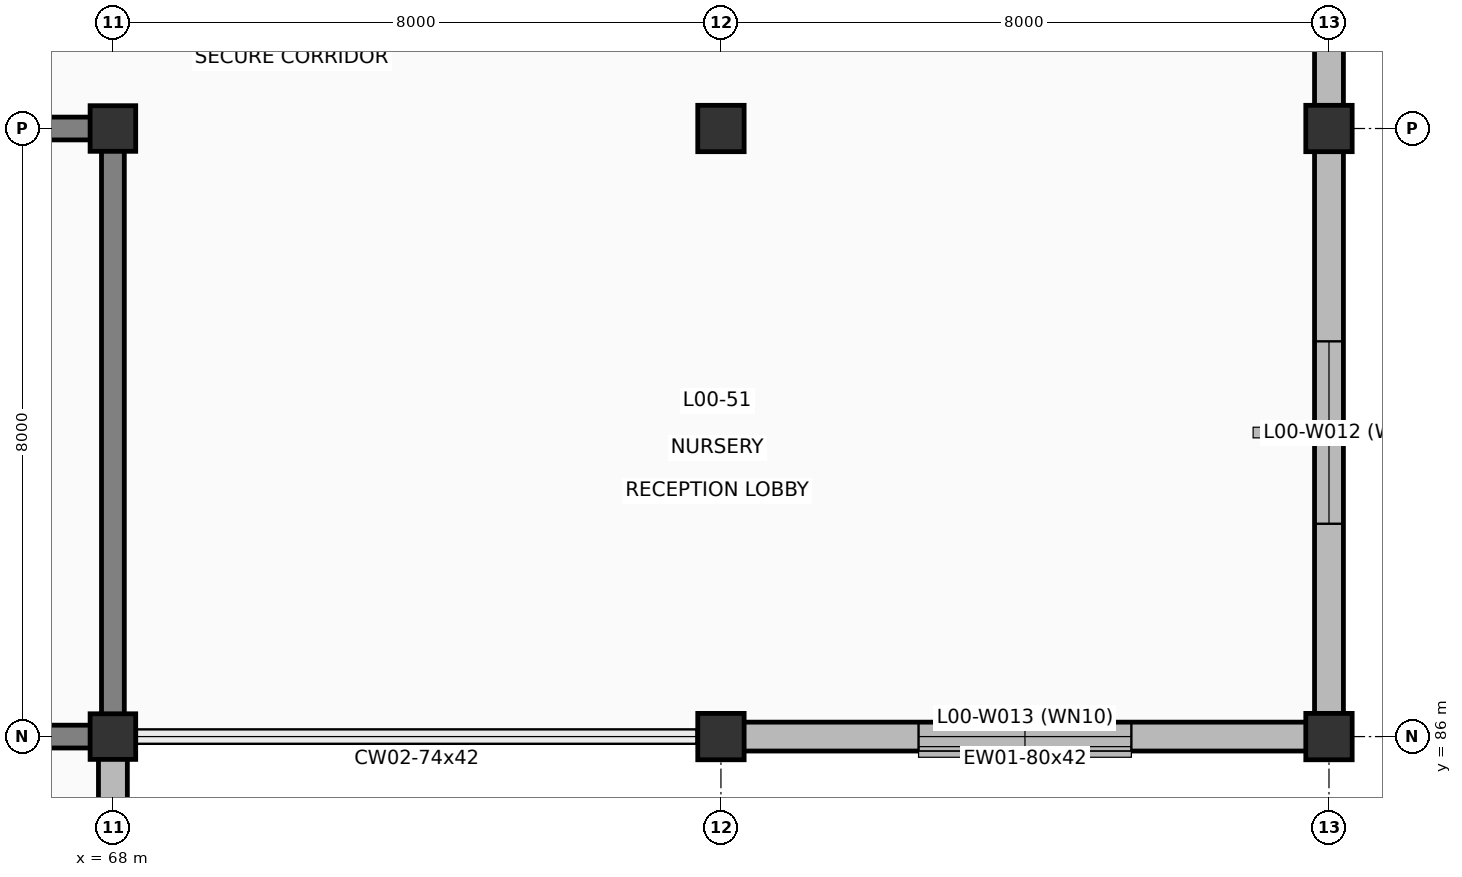
"""IFC4 building model, lengths in metres.
Left out: names, types, materials, properties, quantities, classifications, styles, units other than length and angle.
Written with IfcOpenShell. Run it as: python <this file> out.ifc"""

import sys

from ifc_helpers import new_model, si_unit, direction, frame, frame_2d, origin, origin_2d, place, context, subcontext, project, spatial, rectangle, extrude, element, fill, save


model = new_model("IFC4")
c1 = context("Model", 3, precision=1e-05, world=origin(), true_north=direction((0.0, 1.0)))
c2 = subcontext(c1, "Body", "Model", "MODEL_VIEW")
j1 = project(units=[si_unit("LENGTHUNIT", "METRE"), si_unit("PLANEANGLEUNIT", "RADIAN")], contexts=[c1])
p1 = place(None, origin())
s1 = spatial("IfcSite", under=j1, at=p1, CompositionType="ELEMENT")
p2 = place(p1, origin())
s2 = spatial("IfcBuilding", under=s1, at=p2, CompositionType="ELEMENT")
p3 = place(p2, origin())
s3 = spatial("IfcBuildingStorey", under=s2, at=p3, CompositionType="ELEMENT", Elevation=0.0)
for number, where, z_axis, x_axis in (
    (1, (68.0, 86.0, 0.0), (0.0, 0.0, 1.0), (1.0, 0.0, 0.0)),
    (2, (68.0, 94.0, 0.0), (0.0, 0.0, 1.0), (1.0, 0.0, 0.0)),
):
    element("IfcColumn", number, at=place(p3, frame(where, z_axis=z_axis, x_axis=x_axis)), inside=s3, PredefinedType="COLUMN", context=c2, shape_type="SweptSolid", body=[
        extrude(rectangle(XDim=0.6, YDim=0.6, at=origin_2d()), origin(), (0.0, 0.0, 1.0), 5.4),
    ])
for number, where, z_axis, x_axis in (
    (3, (76.0, 86.0, 0.0), (0.0, 0.0, 1.0), (1.0, 0.0, 0.0)),
    (4, (76.0, 94.0, 0.0), (0.0, 0.0, 1.0), (1.0, 0.0, 0.0)),
    (5, (84.0, 86.0, 0.0), (0.0, 0.0, 1.0), (1.0, 0.0, 0.0)),
    (6, (84.0, 94.0, 0.0), (0.0, 0.0, 1.0), (1.0, 0.0, 0.0)),
):
    element("IfcColumn", number, at=place(p3, frame(where, z_axis=z_axis, x_axis=x_axis)), inside=s3, PredefinedType="COLUMN", context=c2, shape_type="SweptSolid", body=[
        extrude(rectangle(XDim=0.61, YDim=0.61, at=origin_2d()), origin(), (0.0, 0.0, 1.0), 5.4),
    ])
p4 = place(p3, frame((84.0, 102.0, 0.0), z_axis=(0.0, 0.0, 1.0), x_axis=(0.0, -1.0, 0.0)))
e7 = element("IfcWall", 7, at=p4, inside=s3, PredefinedType="SOLIDWALL", context=c2, shape_type="SweptSolid", body=[
    extrude(rectangle(XDim=8.0, YDim=0.38, at=frame_2d((4.0, 0.0))), origin(), (0.0, 0.0, 1.0), 4.445),
])
p5 = place(p4, frame((3.1, 0.0, 0.0)))
e8 = element("IfcOpeningElement", 8, at=p5, cuts=e7, PredefinedType="OPENING", context=c2, shape_type="SweptSolid", body=[
    extrude(rectangle(XDim=1.8, YDim=2.3, at=frame_2d((0.9, 1.15))), frame((0.0, 0.2, 0.0), z_axis=(0.0, -1.0, 0.0), x_axis=(1.0, 0.0, 0.0)), (0.0, 0.0, 1.0), 0.4),
])
p6 = place(p3, frame((84.0, 94.0, 0.0), z_axis=(0.0, 0.0, 1.0), x_axis=(0.0, -1.0, 0.0)))
e9 = element("IfcWall", 9, at=p6, inside=s3, PredefinedType="SOLIDWALL", context=c2, shape_type="SweptSolid", body=[
    extrude(rectangle(XDim=8.0, YDim=0.38, at=frame_2d((4.0, 0.0))), origin(), (0.0, 0.0, 1.0), 4.445),
])
p7 = place(p6, frame((2.8, 0.0, 0.9)))
e10 = element("IfcOpeningElement", 10, at=p7, cuts=e9, PredefinedType="OPENING", context=c2, shape_type="SweptSolid", body=[
    extrude(rectangle(XDim=2.4, YDim=2.7, at=frame_2d((1.2, 1.35))), frame((0.0, 0.2, 0.0), z_axis=(0.0, -1.0, 0.0), x_axis=(1.0, 0.0, 0.0)), (0.0, 0.0, 1.0), 0.4),
])
p8 = place(p3, frame((84.0, 86.0, 0.0), z_axis=(0.0, 0.0, 1.0), x_axis=(-1.0, 0.0, 0.0)))
e11 = element("IfcWall", 11, at=p8, inside=s3, PredefinedType="SOLIDWALL", context=c2, shape_type="SweptSolid", body=[
    extrude(rectangle(XDim=8.0, YDim=0.38, at=frame_2d((4.0, 0.0))), origin(), (0.0, 0.0, 1.0), 4.245),
])
p9 = place(p8, frame((2.6, 0.0, 0.8)))
e12 = element("IfcOpeningElement", 12, at=p9, cuts=e11, PredefinedType="OPENING", context=c2, shape_type="SweptSolid", body=[
    extrude(rectangle(XDim=2.8, YDim=2.9, at=frame_2d((1.4, 1.45))), frame((0.0, 0.2, 0.0), z_axis=(0.0, -1.0, 0.0), x_axis=(1.0, 0.0, 0.0)), (0.0, 0.0, 1.0), 0.4),
])
p10 = place(p3, frame((68.0, 86.0, 0.0), z_axis=(0.0, 0.0, 1.0), x_axis=(0.0, -1.0, 0.0)))
e13 = element("IfcWall", 13, at=p10, inside=s3, PredefinedType="SOLIDWALL", context=c2, shape_type="SweptSolid", body=[
    extrude(rectangle(XDim=8.0, YDim=0.38, at=frame_2d((4.0, 0.0))), origin(), (0.0, 0.0, 1.0), 4.445),
])
p11 = place(p10, frame((3.15, 0.0, 0.0)))
e14 = element("IfcOpeningElement", 14, at=p11, cuts=e13, PredefinedType="OPENING", context=c2, shape_type="SweptSolid", body=[
    extrude(rectangle(XDim=1.7, YDim=2.25, at=frame_2d((0.85, 1.125))), frame((0.0, 0.2, 0.0), z_axis=(0.0, -1.0, 0.0), x_axis=(1.0, 0.0, 0.0)), (0.0, 0.0, 1.0), 0.4),
])
p12 = place(p3, frame((68.0, 86.0, 0.0), z_axis=(0.0, 0.0, 1.0), x_axis=(-1.0, 0.0, 0.0)))
e15 = element("IfcWall", 15, at=p12, inside=s3, PredefinedType="SHEAR", context=c2, shape_type="SweptSolid", body=[
    extrude(rectangle(XDim=8.0, YDim=0.3, at=frame_2d((4.0, 0.0))), origin(), (0.0, 0.0, 1.0), 5.4),
])
p13 = place(p3, frame((60.0, 94.0, 0.0), z_axis=(0.0, 0.0, 1.0), x_axis=(1.0, 0.0, 0.0)))
e16 = element("IfcWall", 16, at=p13, inside=s3, PredefinedType="SHEAR", context=c2, shape_type="SweptSolid", body=[
    extrude(rectangle(XDim=8.0, YDim=0.3, at=frame_2d((4.0, 0.0))), origin(), (0.0, 0.0, 1.0), 5.4),
])
p14 = place(p13, frame((1.45, 0.0, 0.0)))
e17 = element("IfcOpeningElement", 17, at=p14, cuts=e16, PredefinedType="OPENING", context=c2, shape_type="SweptSolid", body=[
    extrude(rectangle(XDim=1.5, YDim=2.2, at=frame_2d((0.75, 1.1))), frame((0.0, 0.16, 0.0), z_axis=(0.0, -1.0, 0.0), x_axis=(1.0, 0.0, 0.0)), (0.0, 0.0, 1.0), 0.32),
])
p15 = place(p3, frame((68.0, 94.0, 0.0), z_axis=(0.0, 0.0, 1.0), x_axis=(0.0, -1.0, 0.0)))
e18 = element("IfcWall", 18, at=p15, inside=s3, PredefinedType="SHEAR", context=c2, shape_type="SweptSolid", body=[
    extrude(rectangle(XDim=8.0, YDim=0.3, at=frame_2d((4.0, 0.0))), origin(), (0.0, 0.0, 1.0), 5.4),
])
p16 = place(p7, origin())
e19 = element("IfcWindow", 19, at=p16, inside=s3, PartitioningType="DOUBLE_PANEL_VERTICAL", PredefinedType="WINDOW", context=c2, shape_type="SweptSolid", body=[
    extrude(rectangle(XDim=2.4, YDim=2.7, at=frame_2d((1.2, 1.35))), frame((0.0, 0.03, 0.0), z_axis=(0.0, -1.0, 0.0), x_axis=(1.0, 0.0, 0.0)), (0.0, 0.0, 1.0), 0.06),
])
fill(e10, e19)
p17 = place(p9, origin())
e20 = element("IfcWindow", 20, at=p17, inside=s3, PartitioningType="TRIPLE_PANEL_VERTICAL", PredefinedType="WINDOW", context=c2, shape_type="SweptSolid", body=[
    extrude(rectangle(XDim=2.8, YDim=2.9, at=frame_2d((1.4, 1.45))), frame((0.0, 0.03, 0.0), z_axis=(0.0, -1.0, 0.0), x_axis=(1.0, 0.0, 0.0)), (0.0, 0.0, 1.0), 0.06),
])
fill(e12, e20)
save(model, sys.argv[1])
